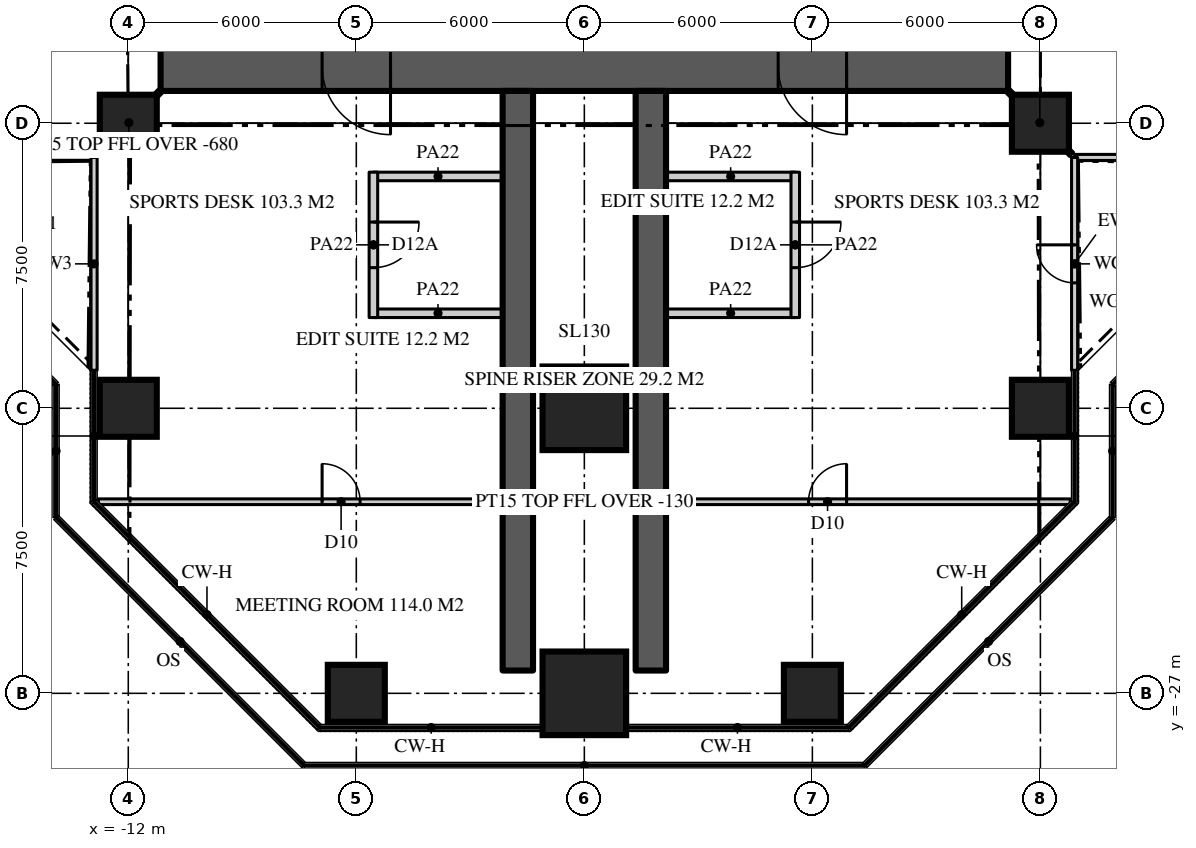
"""IFC4 building model, lengths in metres.
Left out: names, types, materials, properties, quantities, classifications, styles, units other than length and angle.
Written with IfcOpenShell. Run it as: python <this file> out.ifc"""

import sys

from ifc_helpers import new_model, si_unit, direction, frame, frame_2d, origin, origin_2d, place, context, subcontext, project, spatial, rectangle, extrude, element, fill, save


model = new_model("IFC4")
c1 = context("Model", 3, precision=1e-05, world=origin(), true_north=direction((0.0, 1.0)))
c2 = subcontext(c1, "Body", "Model", "MODEL_VIEW")
j1 = project(units=[si_unit("LENGTHUNIT", "METRE"), si_unit("PLANEANGLEUNIT", "RADIAN")], contexts=[c1])
p1 = place(None, origin())
s1 = spatial("IfcSite", under=j1, at=p1, CompositionType="ELEMENT")
p2 = place(p1, origin())
s2 = spatial("IfcBuilding", under=s1, at=p2, CompositionType="ELEMENT")
p3 = place(p2, frame((0.0, 0.0, 220.5)))
s3 = spatial("IfcBuildingStorey", under=s2, at=p3, CompositionType="ELEMENT", Elevation=220.5)
p4 = place(p3, frame((11.15, -10.5, 0.0), z_axis=(0.0, 0.0, 1.0), x_axis=(-1.0, 0.0, 0.0)))
e1 = element("IfcWall", 1, at=p4, inside=s3, PredefinedType="SHEAR", context=c2, shape_type="SweptSolid", body=[
    extrude(rectangle(XDim=22.3, YDim=1.3, at=frame_2d((11.15, 0.0))), origin(), (0.0, 0.0, 1.0), 3.9),
])
p5 = place(p4, frame((16.25, 0.0, 0.0)))
e2 = element("IfcOpeningElement", 2, at=p5, cuts=e1, PredefinedType="OPENING", context=c2, shape_type="SweptSolid", body=[
    extrude(rectangle(XDim=1.8, YDim=2.2, at=frame_2d((0.9, 1.1))), frame((0.0, 0.66, 0.0), z_axis=(0.0, -1.0, 0.0), x_axis=(1.0, 0.0, 0.0)), (0.0, 0.0, 1.0), 1.32),
])
p6 = place(p4, frame((4.25, 0.0, 0.0)))
e3 = element("IfcOpeningElement", 3, at=p6, cuts=e1, PredefinedType="OPENING", context=c2, shape_type="SweptSolid", body=[
    extrude(rectangle(XDim=1.8, YDim=2.2, at=frame_2d((0.9, 1.1))), frame((0.0, 0.66, 0.0), z_axis=(0.0, -1.0, 0.0), x_axis=(1.0, 0.0, 0.0)), (0.0, 0.0, 1.0), 1.32),
])
for number, where, z_axis, x_axis in (
    (4, (-1.75, -11.15, 0.0), (0.0, 0.0, 1.0), (0.0, -1.0, 0.0)),
    (5, (1.75, -11.15, 0.0), (0.0, 0.0, 1.0), (0.0, -1.0, 0.0)),
):
    element("IfcWall", number, at=place(p3, frame(where, z_axis=z_axis, x_axis=x_axis)), inside=s3, PredefinedType="SHEAR", context=c2, shape_type="SweptSolid", body=[
        extrude(rectangle(XDim=15.25, YDim=0.8, at=frame_2d((7.625, 0.0))), origin(), (0.0, 0.0, 1.0), 3.9),
    ])
p7 = place(p3, frame((-6.0, -27.0, 0.0), z_axis=(0.0, 0.0, 1.0), x_axis=(1.0, 0.0, 0.0)))
e6 = element("IfcColumn", 6, at=p7, inside=s3, PredefinedType="COLUMN", context=c2, shape_type="SweptSolid", body=[
    extrude(rectangle(XDim=1.5, YDim=1.5, at=origin_2d()), origin(), (0.0, 0.0, 1.0), 3.9),
])
p8 = place(p3, frame((0.0, -27.0, 0.0), z_axis=(0.0, 0.0, 1.0), x_axis=(1.0, 0.0, 0.0)))
e7 = element("IfcColumn", 7, at=p8, inside=s3, PredefinedType="COLUMN", context=c2, shape_type="SweptSolid", body=[
    extrude(rectangle(XDim=2.2, YDim=2.2, at=origin_2d()), origin(), (0.0, 0.0, 1.0), 3.9),
])
for number, where, z_axis, x_axis in (
    (8, (6.0, -27.0, 0.0), (0.0, 0.0, 1.0), (1.0, 0.0, 0.0)),
    (9, (-12.0, -19.5, 0.0), (0.0, 0.0, 1.0), (1.0, 0.0, 0.0)),
):
    element("IfcColumn", number, at=place(p3, frame(where, z_axis=z_axis, x_axis=x_axis)), inside=s3, PredefinedType="COLUMN", context=c2, shape_type="SweptSolid", body=[
        extrude(rectangle(XDim=1.5, YDim=1.5, at=origin_2d()), origin(), (0.0, 0.0, 1.0), 3.9),
    ])
p9 = place(p3, frame((0.0, -19.5, 0.0), z_axis=(0.0, 0.0, 1.0), x_axis=(1.0, 0.0, 0.0)))
e10 = element("IfcColumn", 10, at=p9, inside=s3, PredefinedType="COLUMN", context=c2, shape_type="SweptSolid", body=[
    extrude(rectangle(XDim=2.2, YDim=2.2, at=origin_2d()), origin(), (0.0, 0.0, 1.0), 3.9),
])
for number, where, z_axis, x_axis in (
    (11, (12.0, -19.5, 0.0), (0.0, 0.0, 1.0), (1.0, 0.0, 0.0)),
    (12, (-12.0, -12.0, 0.0), (0.0, 0.0, 1.0), (1.0, 0.0, 0.0)),
    (13, (12.0, -12.0, 0.0), (0.0, 0.0, 1.0), (1.0, 0.0, 0.0)),
):
    element("IfcColumn", number, at=place(p3, frame(where, z_axis=z_axis, x_axis=x_axis)), inside=s3, PredefinedType="COLUMN", context=c2, shape_type="SweptSolid", body=[
        extrude(rectangle(XDim=1.5, YDim=1.5, at=origin_2d()), origin(), (0.0, 0.0, 1.0), 3.9),
    ])
p10 = place(p3, frame((12.9, -12.9, 0.0), z_axis=(0.0, 0.0, 1.0), x_axis=(1.0, 0.0, 0.0)))
e14 = element("IfcWall", 14, at=p10, inside=s3, PredefinedType="SOLIDWALL", context=c2, shape_type="SweptSolid", body=[
    extrude(rectangle(XDim=5.6, YDim=0.16, at=frame_2d((2.8, 0.0))), origin(), (0.0, 0.0, 1.0), 3.77),
])
p11 = place(p3, frame((-18.5, -12.9, 0.0), z_axis=(0.0, 0.0, 1.0), x_axis=(1.0, 0.0, 0.0)))
e15 = element("IfcWall", 15, at=p11, inside=s3, PredefinedType="SOLIDWALL", context=c2, shape_type="SweptSolid", body=[
    extrude(rectangle(XDim=5.6, YDim=0.16, at=frame_2d((2.8, 0.0))), origin(), (0.0, 0.0, 1.0), 3.77),
])
p12 = place(p11, frame((2.3, 0.0, 0.0)))
e16 = element("IfcOpeningElement", 16, at=p12, cuts=e15, PredefinedType="OPENING", context=c2, shape_type="SweptSolid", body=[
    extrude(rectangle(XDim=1.0, YDim=2.2, at=frame_2d((0.5, 1.1))), frame((0.0, 0.09, 0.0), z_axis=(0.0, -1.0, 0.0), x_axis=(1.0, 0.0, 0.0)), (0.0, 0.0, 1.0), 0.18),
])
p13 = place(p3, frame((-12.9, -12.9, 0.0), z_axis=(0.0, 0.0, 1.0), x_axis=(0.0, -1.0, 0.0)))
e17 = element("IfcWall", 17, at=p13, inside=s3, PredefinedType="SOLIDWALL", context=c2, shape_type="SweptSolid", body=[
    extrude(rectangle(XDim=5.6, YDim=0.16, at=frame_2d((2.8, 0.0))), origin(), (0.0, 0.0, 1.0), 3.77),
])
p14 = place(p3, frame((12.9, -18.5, 0.0), z_axis=(0.0, 0.0, 1.0), x_axis=(0.0, 1.0, 0.0)))
e18 = element("IfcWall", 18, at=p14, inside=s3, PredefinedType="SOLIDWALL", context=c2, shape_type="SweptSolid", body=[
    extrude(rectangle(XDim=5.6, YDim=0.16, at=frame_2d((2.8, 0.0))), origin(), (0.0, 0.0, 1.0), 3.77),
])
p15 = place(p14, frame((2.3, 0.0, 0.0)))
e19 = element("IfcOpeningElement", 19, at=p15, cuts=e18, PredefinedType="OPENING", context=c2, shape_type="SweptSolid", body=[
    extrude(rectangle(XDim=1.0, YDim=2.2, at=frame_2d((0.5, 1.1))), frame((0.0, 0.09, 0.0), z_axis=(0.0, -1.0, 0.0), x_axis=(1.0, 0.0, 0.0)), (0.0, 0.0, 1.0), 0.18),
])
p16 = place(p3, frame((-12.786, -21.959, 0.0), z_axis=(0.0, 0.0, 1.0), x_axis=(1.0, 0.0, 0.0)))
e20 = element("IfcWall", 20, at=p16, inside=s3, PredefinedType="PARTITIONING", context=c2, shape_type="SweptSolid", body=[
    extrude(rectangle(XDim=25.573, YDim=0.15, at=frame_2d((12.786, 0.0))), origin(), (0.0, 0.0, 1.0), 3.77),
])
p17 = place(p16, frame((18.687, 0.0, 0.0)))
e21 = element("IfcOpeningElement", 21, at=p17, cuts=e20, PredefinedType="OPENING", context=c2, shape_type="SweptSolid", body=[
    extrude(rectangle(XDim=1.0, YDim=2.2, at=frame_2d((0.5, 1.1))), frame((0.0, 0.085, 0.0), z_axis=(0.0, -1.0, 0.0), x_axis=(1.0, 0.0, 0.0)), (0.0, 0.0, 1.0), 0.17),
])
p18 = place(p16, frame((5.886, 0.0, 0.0)))
e22 = element("IfcOpeningElement", 22, at=p18, cuts=e20, PredefinedType="OPENING", context=c2, shape_type="SweptSolid", body=[
    extrude(rectangle(XDim=1.0, YDim=2.2, at=frame_2d((0.5, 1.1))), frame((0.0, 0.085, 0.0), z_axis=(0.0, -1.0, 0.0), x_axis=(1.0, 0.0, 0.0)), (0.0, 0.0, 1.0), 0.17),
])
for number, where, z_axis, x_axis in (
    (23, (2.15, -13.4, 0.0), (0.0, 0.0, 1.0), (1.0, 0.0, 0.0)),
    (24, (2.15, -17.0, 0.0), (0.0, 0.0, 1.0), (1.0, 0.0, 0.0)),
):
    element("IfcWall", number, at=place(p3, frame(where, z_axis=z_axis, x_axis=x_axis)), inside=s3, PredefinedType="PARTITIONING", context=c2, shape_type="SweptSolid", body=[
        extrude(rectangle(XDim=3.4, YDim=0.225, at=frame_2d((1.7, 0.0))), origin(), (0.0, 0.0, 1.0), 3.77),
    ])
p19 = place(p3, frame((5.55, -13.288, 0.0), z_axis=(0.0, 0.0, 1.0), x_axis=(0.0, -1.0, 0.0)))
e25 = element("IfcWall", 25, at=p19, inside=s3, PredefinedType="PARTITIONING", context=c2, shape_type="SweptSolid", body=[
    extrude(rectangle(XDim=3.825, YDim=0.225, at=frame_2d((1.913, 0.0))), origin(), (0.0, 0.0, 1.0), 3.77),
])
p20 = place(p19, frame((1.312, 0.0, 0.0)))
e26 = element("IfcOpeningElement", 26, at=p20, cuts=e25, PredefinedType="OPENING", context=c2, shape_type="SweptSolid", body=[
    extrude(rectangle(XDim=1.2, YDim=2.2, at=frame_2d((0.6, 1.1))), frame((0.0, 0.123, 0.0), z_axis=(0.0, -1.0, 0.0), x_axis=(1.0, 0.0, 0.0)), (0.0, 0.0, 1.0), 0.245),
])
for number, where, z_axis, x_axis in (
    (27, (-2.15, -13.4, 0.0), (0.0, 0.0, 1.0), (-1.0, 0.0, 0.0)),
    (28, (-2.15, -17.0, 0.0), (0.0, 0.0, 1.0), (-1.0, 0.0, 0.0)),
):
    element("IfcWall", number, at=place(p3, frame(where, z_axis=z_axis, x_axis=x_axis)), inside=s3, PredefinedType="PARTITIONING", context=c2, shape_type="SweptSolid", body=[
        extrude(rectangle(XDim=3.4, YDim=0.225, at=frame_2d((1.7, 0.0))), origin(), (0.0, 0.0, 1.0), 3.77),
    ])
p21 = place(p3, frame((-5.55, -13.288, 0.0), z_axis=(0.0, 0.0, 1.0), x_axis=(0.0, -1.0, 0.0)))
e29 = element("IfcWall", 29, at=p21, inside=s3, PredefinedType="PARTITIONING", context=c2, shape_type="SweptSolid", body=[
    extrude(rectangle(XDim=3.825, YDim=0.225, at=frame_2d((1.913, 0.0))), origin(), (0.0, 0.0, 1.0), 3.77),
])
p22 = place(p21, frame((1.312, 0.0, 0.0)))
e30 = element("IfcOpeningElement", 30, at=p22, cuts=e29, PredefinedType="OPENING", context=c2, shape_type="SweptSolid", body=[
    extrude(rectangle(XDim=1.2, YDim=2.2, at=frame_2d((0.6, 1.1))), frame((0.0, 0.123, 0.0), z_axis=(0.0, -1.0, 0.0), x_axis=(1.0, 0.0, 0.0)), (0.0, 0.0, 1.0), 0.245),
])
for number, where, z_axis, x_axis in (
    (31, (-11.15, -11.15, 0.0), (0.0, 0.0, 1.0), (-0.707, -0.707, 0.0)),
    (32, (11.15, -11.15, 0.0), (0.0, 0.0, 1.0), (0.707, -0.707, 0.0)),
):
    element("IfcWall", number, at=place(p3, frame(where, z_axis=z_axis, x_axis=x_axis)), inside=s3, PredefinedType="PARTITIONING", context=c2, shape_type="SweptSolid", body=[
        extrude(rectangle(XDim=2.362, YDim=0.15, at=frame_2d((1.181, 0.0))), origin(), (0.0, 0.0, 1.0), 3.22),
    ])
p23 = place(p15, origin())
e33 = element("IfcDoor", 33, at=p23, inside=s3, OperationType="SINGLE_SWING_RIGHT", PredefinedType="DOOR", context=c2, shape_type="SweptSolid", body=[
    extrude(rectangle(XDim=1.0, YDim=2.2, at=frame_2d((0.5, 1.1))), frame((0.0, 0.025, 0.0), z_axis=(0.0, -1.0, 0.0), x_axis=(1.0, 0.0, 0.0)), (0.0, 0.0, 1.0), 0.05),
])
fill(e19, e33)
p24 = place(p5, origin())
e34 = element("IfcDoor", 34, at=p24, inside=s3, OperationType="DOUBLE_DOOR_DOUBLE_SWING", PredefinedType="DOOR", context=c2, shape_type="SweptSolid", body=[
    extrude(rectangle(XDim=1.8, YDim=2.2, at=frame_2d((0.9, 1.1))), frame((0.0, 0.025, 0.0), z_axis=(0.0, -1.0, 0.0), x_axis=(1.0, 0.0, 0.0)), (0.0, 0.0, 1.0), 0.05),
])
fill(e2, e34)
p25 = place(p6, origin())
e35 = element("IfcDoor", 35, at=p25, inside=s3, OperationType="DOUBLE_DOOR_DOUBLE_SWING", PredefinedType="DOOR", context=c2, shape_type="SweptSolid", body=[
    extrude(rectangle(XDim=1.8, YDim=2.2, at=frame_2d((0.9, 1.1))), frame((0.0, 0.025, 0.0), z_axis=(0.0, -1.0, 0.0), x_axis=(1.0, 0.0, 0.0)), (0.0, 0.0, 1.0), 0.05),
])
fill(e3, e35)
p26 = place(p17, origin())
e36 = element("IfcDoor", 36, at=p26, inside=s3, OperationType="SINGLE_SWING_RIGHT", PredefinedType="DOOR", context=c2, shape_type="SweptSolid", body=[
    extrude(rectangle(XDim=1.0, YDim=2.2, at=frame_2d((0.5, 1.1))), frame((0.0, 0.025, 0.0), z_axis=(0.0, -1.0, 0.0), x_axis=(1.0, 0.0, 0.0)), (0.0, 0.0, 1.0), 0.05),
])
fill(e21, e36)
p27 = place(p18, origin())
e37 = element("IfcDoor", 37, at=p27, inside=s3, OperationType="SINGLE_SWING_LEFT", PredefinedType="DOOR", context=c2, shape_type="SweptSolid", body=[
    extrude(rectangle(XDim=1.0, YDim=2.2, at=frame_2d((0.5, 1.1))), frame((0.0, 0.025, 0.0), z_axis=(0.0, -1.0, 0.0), x_axis=(1.0, 0.0, 0.0)), (0.0, 0.0, 1.0), 0.05),
])
fill(e22, e37)
p28 = place(p20, origin())
e38 = element("IfcDoor", 38, at=p28, inside=s3, OperationType="SINGLE_SWING_LEFT", PredefinedType="DOOR", context=c2, shape_type="SweptSolid", body=[
    extrude(rectangle(XDim=1.2, YDim=2.2, at=frame_2d((0.6, 1.1))), frame((0.0, 0.025, 0.0), z_axis=(0.0, -1.0, 0.0), x_axis=(1.0, 0.0, 0.0)), (0.0, 0.0, 1.0), 0.05),
])
fill(e26, e38)
p29 = place(p22, origin())
e39 = element("IfcDoor", 39, at=p29, inside=s3, OperationType="SINGLE_SWING_LEFT", PredefinedType="DOOR", context=c2, shape_type="SweptSolid", body=[
    extrude(rectangle(XDim=1.2, YDim=2.2, at=frame_2d((0.6, 1.1))), frame((0.0, 0.025, 0.0), z_axis=(0.0, -1.0, 0.0), x_axis=(1.0, 0.0, 0.0)), (0.0, 0.0, 1.0), 0.05),
])
fill(e30, e39)
save(model, sys.argv[1])
